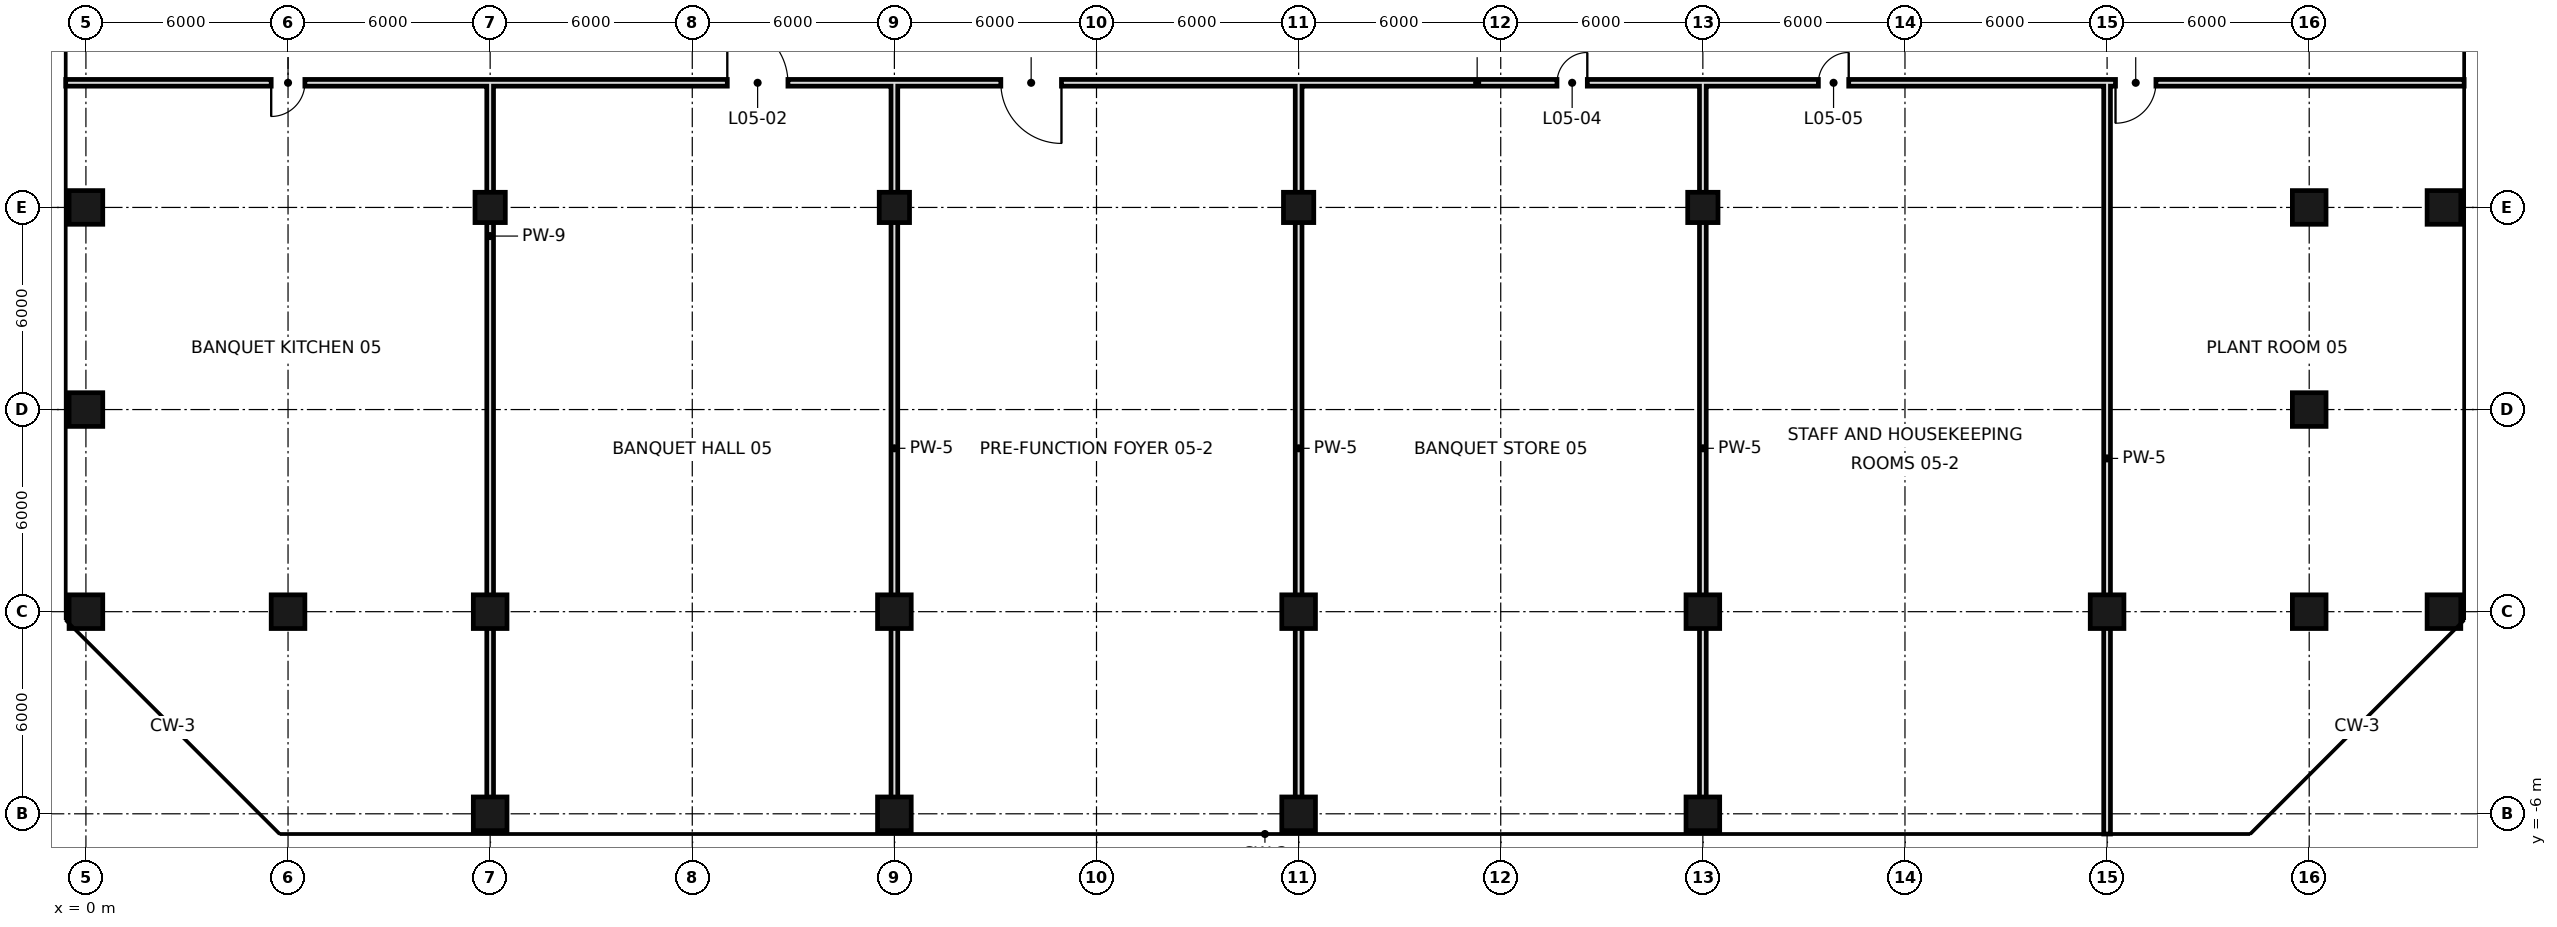
"""IFC4 building model, lengths in metres.
Left out: names, types, materials, properties, quantities, classifications, styles, units other than length and angle.
Written with IfcOpenShell. Run it as: python <this file> out.ifc"""

import sys

from ifc_helpers import new_model, si_unit, direction, frame, frame_2d, origin, origin_2d, place, context, subcontext, project, spatial, rectangle, hollow_rectangle, extrude, element, fill, save


model = new_model("IFC4")
c1 = context("Model", 3, precision=1e-05, world=origin(), true_north=direction((0.0, 1.0)))
c2 = subcontext(c1, "Body", "Model", "MODEL_VIEW")
j1 = project(units=[si_unit("LENGTHUNIT", "METRE"), si_unit("PLANEANGLEUNIT", "RADIAN")], contexts=[c1])
p1 = place(None, origin())
s1 = spatial("IfcSite", under=j1, at=p1, CompositionType="ELEMENT")
p2 = place(p1, origin())
s2 = spatial("IfcBuilding", under=s1, at=p2, CompositionType="ELEMENT")
p3 = place(p2, frame((0.0, 0.0, 34.8)))
s3 = spatial("IfcBuildingStorey", under=s2, at=p3, CompositionType="ELEMENT", Elevation=34.8)
for number, where, z_axis, x_axis in (
    (1, (0.0, 0.0, 0.0), (0.0, 0.0, 1.0), (1.0, 0.0, 0.0)),
    (2, (0.0, 6.0, 0.0), (0.0, 0.0, 1.0), (1.0, 0.0, 0.0)),
    (3, (0.0, 12.0, 0.0), (0.0, 0.0, 1.0), (1.0, 0.0, 0.0)),
    (4, (6.0, 0.0, 0.0), (0.0, 0.0, 1.0), (1.0, 0.0, 0.0)),
    (5, (12.0, -6.0, 0.0), (0.0, 0.0, 1.0), (1.0, 0.0, 0.0)),
    (6, (12.0, 0.0, 0.0), (0.0, 0.0, 1.0), (1.0, 0.0, 0.0)),
):
    element("IfcColumn", number, at=place(p3, frame(where, z_axis=z_axis, x_axis=x_axis)), inside=s3, PredefinedType="COLUMN", context=c2, shape_type="SweptSolid", body=[
        extrude(hollow_rectangle(XDim=1.0, YDim=1.0, WallThickness=0.05, at=origin_2d()), origin(), (0.0, 0.0, 1.0), 4.8),
    ])
p4 = place(p3, frame((12.0, 12.0, 0.0), z_axis=(0.0, 0.0, 1.0), x_axis=(1.0, 0.0, 0.0)))
e7 = element("IfcColumn", 7, at=p4, inside=s3, PredefinedType="COLUMN", context=c2, shape_type="SweptSolid", body=[
    extrude(hollow_rectangle(XDim=0.9, YDim=0.9, WallThickness=0.045, at=origin_2d()), origin(), (0.0, 0.0, 1.0), 4.8),
])
for number, where, z_axis, x_axis in (
    (8, (24.0, -6.0, 0.0), (0.0, 0.0, 1.0), (1.0, 0.0, 0.0)),
    (9, (24.0, 0.0, 0.0), (0.0, 0.0, 1.0), (1.0, 0.0, 0.0)),
):
    element("IfcColumn", number, at=place(p3, frame(where, z_axis=z_axis, x_axis=x_axis)), inside=s3, PredefinedType="COLUMN", context=c2, shape_type="SweptSolid", body=[
        extrude(hollow_rectangle(XDim=1.0, YDim=1.0, WallThickness=0.05, at=origin_2d()), origin(), (0.0, 0.0, 1.0), 4.8),
    ])
p5 = place(p3, frame((24.0, 12.0, 0.0), z_axis=(0.0, 0.0, 1.0), x_axis=(1.0, 0.0, 0.0)))
e10 = element("IfcColumn", 10, at=p5, inside=s3, PredefinedType="COLUMN", context=c2, shape_type="SweptSolid", body=[
    extrude(hollow_rectangle(XDim=0.9, YDim=0.9, WallThickness=0.045, at=origin_2d()), origin(), (0.0, 0.0, 1.0), 4.8),
])
for number, where, z_axis, x_axis in (
    (11, (36.0, -6.0, 0.0), (0.0, 0.0, 1.0), (1.0, 0.0, 0.0)),
    (12, (36.0, 0.0, 0.0), (0.0, 0.0, 1.0), (1.0, 0.0, 0.0)),
):
    element("IfcColumn", number, at=place(p3, frame(where, z_axis=z_axis, x_axis=x_axis)), inside=s3, PredefinedType="COLUMN", context=c2, shape_type="SweptSolid", body=[
        extrude(hollow_rectangle(XDim=1.0, YDim=1.0, WallThickness=0.05, at=origin_2d()), origin(), (0.0, 0.0, 1.0), 4.8),
    ])
p6 = place(p3, frame((36.0, 12.0, 0.0), z_axis=(0.0, 0.0, 1.0), x_axis=(1.0, 0.0, 0.0)))
e13 = element("IfcColumn", 13, at=p6, inside=s3, PredefinedType="COLUMN", context=c2, shape_type="SweptSolid", body=[
    extrude(hollow_rectangle(XDim=0.9, YDim=0.9, WallThickness=0.045, at=origin_2d()), origin(), (0.0, 0.0, 1.0), 4.8),
])
for number, where, z_axis, x_axis in (
    (14, (48.0, -6.0, 0.0), (0.0, 0.0, 1.0), (1.0, 0.0, 0.0)),
    (15, (48.0, 0.0, 0.0), (0.0, 0.0, 1.0), (1.0, 0.0, 0.0)),
):
    element("IfcColumn", number, at=place(p3, frame(where, z_axis=z_axis, x_axis=x_axis)), inside=s3, PredefinedType="COLUMN", context=c2, shape_type="SweptSolid", body=[
        extrude(hollow_rectangle(XDim=1.0, YDim=1.0, WallThickness=0.05, at=origin_2d()), origin(), (0.0, 0.0, 1.0), 4.8),
    ])
p7 = place(p3, frame((48.0, 12.0, 0.0), z_axis=(0.0, 0.0, 1.0), x_axis=(1.0, 0.0, 0.0)))
e16 = element("IfcColumn", 16, at=p7, inside=s3, PredefinedType="COLUMN", context=c2, shape_type="SweptSolid", body=[
    extrude(hollow_rectangle(XDim=0.9, YDim=0.9, WallThickness=0.045, at=origin_2d()), origin(), (0.0, 0.0, 1.0), 4.8),
])
for number, where, z_axis, x_axis in (
    (17, (60.0, 0.0, 0.0), (0.0, 0.0, 1.0), (1.0, 0.0, 0.0)),
    (18, (66.0, 0.0, 0.0), (0.0, 0.0, 1.0), (1.0, 0.0, 0.0)),
    (19, (66.0, 6.0, 0.0), (0.0, 0.0, 1.0), (1.0, 0.0, 0.0)),
    (20, (66.0, 12.0, 0.0), (0.0, 0.0, 1.0), (1.0, 0.0, 0.0)),
    (21, (70.0, 0.0, 0.0), (0.0, 0.0, 1.0), (1.0, 0.0, 0.0)),
    (22, (70.0, 12.0, 0.0), (0.0, 0.0, 1.0), (1.0, 0.0, 0.0)),
):
    element("IfcColumn", number, at=place(p3, frame(where, z_axis=z_axis, x_axis=x_axis)), inside=s3, PredefinedType="COLUMN", context=c2, shape_type="SweptSolid", body=[
        extrude(hollow_rectangle(XDim=1.0, YDim=1.0, WallThickness=0.05, at=origin_2d()), origin(), (0.0, 0.0, 1.0), 4.8),
    ])
for number, where, z_axis, x_axis in (
    (23, (12.0, -6.0, 0.0), (0.0, 0.0, 1.0), (0.0, 1.0, 0.0)),
    (24, (24.0, -6.0, 0.0), (0.0, 0.0, 1.0), (0.0, 1.0, 0.0)),
    (25, (36.0, -6.0, 0.0), (0.0, 0.0, 1.0), (0.0, 1.0, 0.0)),
    (26, (48.0, -6.0, 0.0), (0.0, 0.0, 1.0), (0.0, 1.0, 0.0)),
):
    element("IfcWall", number, at=place(p3, frame(where, z_axis=z_axis, x_axis=x_axis)), inside=s3, PredefinedType="SOLIDWALL", context=c2, shape_type="SweptSolid", body=[
        extrude(rectangle(XDim=21.7, YDim=0.2, at=frame_2d((10.85, 0.0))), origin(), (0.0, 0.0, 1.0), 3.7),
    ])
p8 = place(p3, frame((60.0, -6.6, 0.0), z_axis=(0.0, 0.0, 1.0), x_axis=(0.0, 1.0, 0.0)))
e27 = element("IfcWall", 27, at=p8, inside=s3, PredefinedType="SOLIDWALL", context=c2, shape_type="SweptSolid", body=[
    extrude(rectangle(XDim=22.3, YDim=0.2, at=frame_2d((11.15, 0.0))), origin(), (0.0, 0.0, 1.0), 3.5),
])
p9 = place(p3, frame((12.0, 15.7, 0.0), z_axis=(0.0, 0.0, 1.0), x_axis=(1.0, 0.0, 0.0)))
e28 = element("IfcWall", 28, at=p9, inside=s3, PredefinedType="SOLIDWALL", context=c2, shape_type="SweptSolid", body=[
    extrude(rectangle(XDim=58.6, YDim=0.2, at=frame_2d((29.3, 0.0))), origin(), (0.0, 0.0, 1.0), 3.7),
])
p10 = place(p9, frame((7.04, 0.0, 0.0)))
e29 = element("IfcOpeningElement", 29, at=p10, cuts=e28, PredefinedType="OPENING", context=c2, shape_type="SweptSolid", body=[
    extrude(rectangle(XDim=1.8, YDim=2.4, at=frame_2d((0.9, 1.2))), frame((0.0, 0.11, 0.0), z_axis=(0.0, -1.0, 0.0), x_axis=(1.0, 0.0, 0.0)), (0.0, 0.0, 1.0), 0.22),
])
p11 = place(p9, frame((15.16, 0.0, 0.0)))
e30 = element("IfcOpeningElement", 30, at=p11, cuts=e28, PredefinedType="OPENING", context=c2, shape_type="SweptSolid", body=[
    extrude(rectangle(XDim=1.8, YDim=2.4, at=frame_2d((0.9, 1.2))), frame((0.0, 0.11, 0.0), z_axis=(0.0, -1.0, 0.0), x_axis=(1.0, 0.0, 0.0)), (0.0, 0.0, 1.0), 0.22),
])
p12 = place(p9, frame((31.67, 0.0, 0.0)))
e31 = element("IfcOpeningElement", 31, at=p12, cuts=e28, PredefinedType="OPENING", context=c2, shape_type="SweptSolid", body=[
    extrude(rectangle(XDim=0.9, YDim=2.1, at=frame_2d((0.45, 1.05))), frame((0.0, 0.11, 0.0), z_axis=(0.0, -1.0, 0.0), x_axis=(1.0, 0.0, 0.0)), (0.0, 0.0, 1.0), 0.22),
])
p13 = place(p9, frame((39.43, 0.0, 0.0)))
e32 = element("IfcOpeningElement", 32, at=p13, cuts=e28, PredefinedType="OPENING", context=c2, shape_type="SweptSolid", body=[
    extrude(rectangle(XDim=0.9, YDim=2.1, at=frame_2d((0.45, 1.05))), frame((0.0, 0.11, 0.0), z_axis=(0.0, -1.0, 0.0), x_axis=(1.0, 0.0, 0.0)), (0.0, 0.0, 1.0), 0.22),
])
p14 = place(p9, frame((48.25, 0.0, 0.0)))
e33 = element("IfcOpeningElement", 33, at=p14, cuts=e28, PredefinedType="OPENING", context=c2, shape_type="SweptSolid", body=[
    extrude(rectangle(XDim=1.2, YDim=2.4, at=frame_2d((0.6, 1.2))), frame((0.0, 0.11, 0.0), z_axis=(0.0, -1.0, 0.0), x_axis=(1.0, 0.0, 0.0)), (0.0, 0.0, 1.0), 0.22),
])
p15 = place(p3, frame((-0.6, 15.7, 0.0), z_axis=(0.0, 0.0, 1.0), x_axis=(1.0, 0.0, 0.0)))
e34 = element("IfcWall", 34, at=p15, inside=s3, PredefinedType="SOLIDWALL", context=c2, shape_type="SweptSolid", body=[
    extrude(rectangle(XDim=12.6, YDim=0.2, at=frame_2d((6.3, 0.0))), origin(), (0.0, 0.0, 1.0), 3.7),
])
p16 = place(p15, frame((6.1, 0.0, 0.0)))
e35 = element("IfcOpeningElement", 35, at=p16, cuts=e34, PredefinedType="OPENING", context=c2, shape_type="SweptSolid", body=[
    extrude(rectangle(XDim=1.0, YDim=2.4, at=frame_2d((0.5, 1.2))), frame((0.0, 0.11, 0.0), z_axis=(0.0, -1.0, 0.0), x_axis=(1.0, 0.0, 0.0)), (0.0, 0.0, 1.0), 0.22),
])
p17 = place(p16, frame((1.0, 0.0, 0.0), z_axis=(0.0, 0.0, 1.0), x_axis=(-1.0, 0.0, 0.0)))
e36 = element("IfcDoor", 36, at=p17, inside=s3, OperationType="SINGLE_SWING_RIGHT", PredefinedType="DOOR", context=c2, shape_type="SweptSolid", body=[
    extrude(rectangle(XDim=1.0, YDim=2.4, at=frame_2d((0.5, 1.2))), frame((0.0, 0.025, 0.0), z_axis=(0.0, -1.0, 0.0), x_axis=(1.0, 0.0, 0.0)), (0.0, 0.0, 1.0), 0.05),
])
fill(e35, e36)
p18 = place(p10, origin())
e37 = element("IfcDoor", 37, at=p18, inside=s3, OperationType="SINGLE_SWING_LEFT", PredefinedType="DOOR", context=c2, shape_type="SweptSolid", body=[
    extrude(rectangle(XDim=1.8, YDim=2.4, at=frame_2d((0.9, 1.2))), frame((0.0, 0.025, 0.0), z_axis=(0.0, -1.0, 0.0), x_axis=(1.0, 0.0, 0.0)), (0.0, 0.0, 1.0), 0.05),
])
fill(e29, e37)
p19 = place(p11, origin())
e38 = element("IfcDoor", 38, at=p19, inside=s3, OperationType="SINGLE_SWING_RIGHT", PredefinedType="DOOR", context=c2, shape_type="SweptSolid", body=[
    extrude(rectangle(XDim=1.8, YDim=2.4, at=frame_2d((0.9, 1.2))), frame((0.0, 0.025, 0.0), z_axis=(0.0, -1.0, 0.0), x_axis=(1.0, 0.0, 0.0)), (0.0, 0.0, 1.0), 0.05),
])
fill(e30, e38)
p20 = place(p12, frame((0.9, 0.0, 0.0), z_axis=(0.0, 0.0, 1.0), x_axis=(-1.0, 0.0, 0.0)))
e39 = element("IfcDoor", 39, at=p20, inside=s3, OperationType="SINGLE_SWING_LEFT", PredefinedType="DOOR", context=c2, shape_type="SweptSolid", body=[
    extrude(rectangle(XDim=0.9, YDim=2.1, at=frame_2d((0.45, 1.05))), frame((0.0, 0.025, 0.0), z_axis=(0.0, -1.0, 0.0), x_axis=(1.0, 0.0, 0.0)), (0.0, 0.0, 1.0), 0.05),
])
fill(e31, e39)
p21 = place(p13, frame((0.9, 0.0, 0.0), z_axis=(0.0, 0.0, 1.0), x_axis=(-1.0, 0.0, 0.0)))
e40 = element("IfcDoor", 40, at=p21, inside=s3, OperationType="SINGLE_SWING_LEFT", PredefinedType="DOOR", context=c2, shape_type="SweptSolid", body=[
    extrude(rectangle(XDim=0.9, YDim=2.1, at=frame_2d((0.45, 1.05))), frame((0.0, 0.025, 0.0), z_axis=(0.0, -1.0, 0.0), x_axis=(1.0, 0.0, 0.0)), (0.0, 0.0, 1.0), 0.05),
])
fill(e32, e40)
p22 = place(p14, frame((1.2, 0.0, 0.0), z_axis=(0.0, 0.0, 1.0), x_axis=(-1.0, 0.0, 0.0)))
e41 = element("IfcDoor", 41, at=p22, inside=s3, OperationType="SINGLE_SWING_RIGHT", PredefinedType="DOOR", context=c2, shape_type="SweptSolid", body=[
    extrude(rectangle(XDim=1.2, YDim=2.4, at=frame_2d((0.6, 1.2))), frame((0.0, 0.025, 0.0), z_axis=(0.0, -1.0, 0.0), x_axis=(1.0, 0.0, 0.0)), (0.0, 0.0, 1.0), 0.05),
])
fill(e33, e41)
save(model, sys.argv[1])
